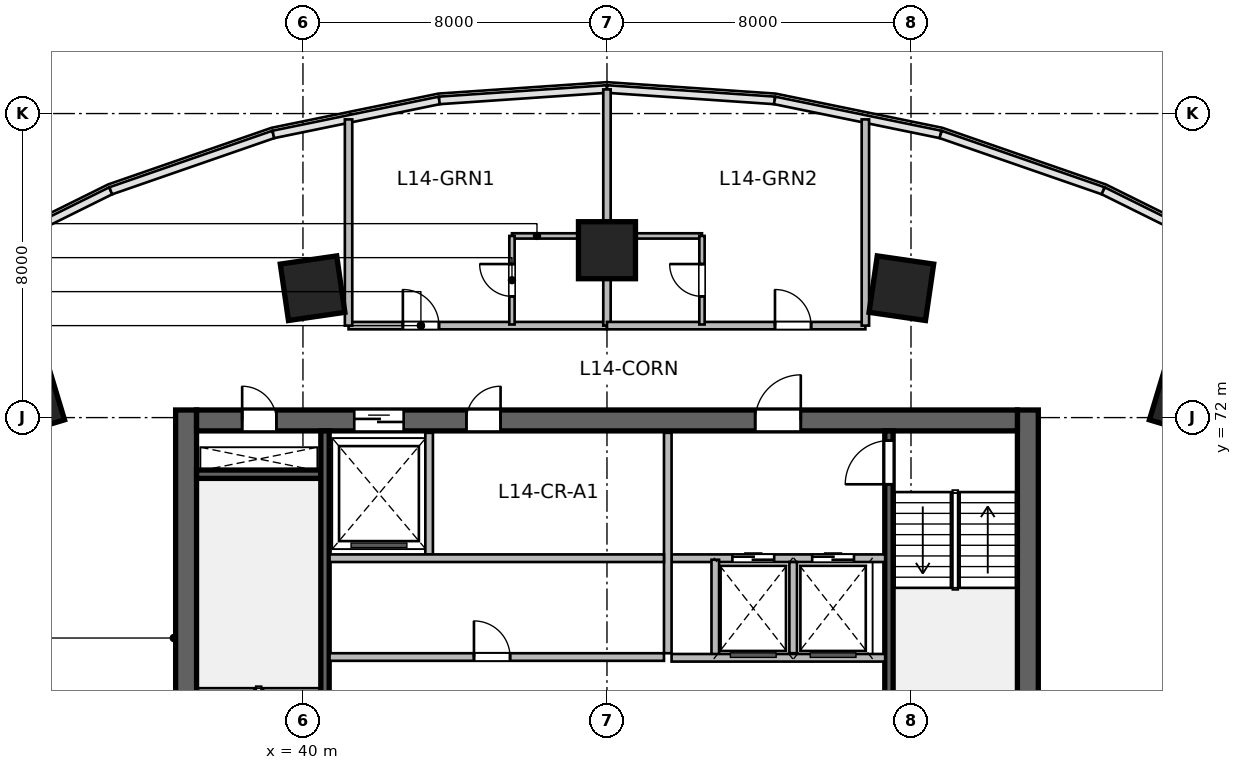
"""IFC4 building model, lengths in metres.
Left out: names, types, materials, properties, quantities, classifications, styles, units other than length and angle.
Written with IfcOpenShell. Run it as: python <this file> out.ifc"""

import sys

from ifc_helpers import new_model, si_unit, direction, frame, frame_2d, origin, origin_2d, place, context, subcontext, project, spatial, rectangle, extrude, source, transform, mapped, element, fill, save


model = new_model("IFC4")
c1 = context("Model", 3, precision=1e-05, world=origin(), true_north=direction((0.0, 1.0)))
c2 = subcontext(c1, "Body", "Model", "MODEL_VIEW")
j1 = project(units=[si_unit("LENGTHUNIT", "METRE"), si_unit("PLANEANGLEUNIT", "RADIAN")], contexts=[c1])
p1 = place(None, origin())
s1 = spatial("IfcSite", under=j1, at=p1, CompositionType="ELEMENT")
p2 = place(p1, origin())
s2 = spatial("IfcBuilding", under=s1, at=p2, CompositionType="ELEMENT")
p3 = place(p2, frame((0.0, 0.0, 64.2)))
s3 = spatial("IfcBuildingStorey", under=s2, at=p3, CompositionType="ELEMENT", Elevation=64.2)
m1 = source(origin(), c2, "Body", "SweptSolid", [
    extrude(rectangle(XDim=12.0, YDim=0.55, at=frame_2d((6.0, 0.0))), origin(), (0.0, 0.0, 1.0), 3.6),
])
for number, where, z_axis, x_axis in (
    (1, (36.925, 60.2, 0.0), (0.0, 0.0, 1.0), (0.0, 1.0, 0.0)),
    (2, (59.075, 60.2, 0.0), (0.0, 0.0, 1.0), (0.0, 1.0, 0.0)),
):
    element("IfcWall", number, at=place(p3, frame(where, z_axis=z_axis, x_axis=x_axis)), inside=s3, PredefinedType="SHEAR", context=c2, shape_type="MappedRepresentation", body=[
        mapped(m1, transform((0.0, 0.0, 0.0), scale=1.0)),
    ])
m2 = source(origin(), c2, "Body", "SweptSolid", [
    extrude(rectangle(XDim=21.6, YDim=0.55, at=frame_2d((10.8, 0.0))), origin(), (0.0, 0.0, 1.0), 3.6),
])
p4 = place(p3, frame((37.2, 71.925, 0.0), z_axis=(0.0, 0.0, 1.0), x_axis=(1.0, 0.0, 0.0)))
e3 = element("IfcWall", 3, at=p4, inside=s3, PredefinedType="SHEAR", context=c2, shape_type="MappedRepresentation", body=[
    mapped(m2, transform((0.0, 0.0, 0.0), scale=1.0)),
])
p5 = place(p4, frame((1.2, 0.0, 0.0)))
e4 = element("IfcOpeningElement", 4, at=p5, cuts=e3, PredefinedType="OPENING", context=c2, shape_type="SweptSolid", body=[
    extrude(rectangle(XDim=0.9, YDim=2.1, at=frame_2d((0.45, 1.05))), frame((0.0, 0.285, 0.0), z_axis=(0.0, -1.0, 0.0), x_axis=(1.0, 0.0, 0.0)), (0.0, 0.0, 1.0), 0.57),
])
p6 = place(p4, frame((14.7, 0.0, 0.0)))
e5 = element("IfcOpeningElement", 5, at=p6, cuts=e3, PredefinedType="OPENING", context=c2, shape_type="SweptSolid", body=[
    extrude(rectangle(XDim=1.2, YDim=2.15, at=frame_2d((0.6, 1.075))), frame((0.0, 0.285, 0.0), z_axis=(0.0, -1.0, 0.0), x_axis=(1.0, 0.0, 0.0)), (0.0, 0.0, 1.0), 0.57),
])
p7 = place(p4, frame((4.15, 0.0, 0.0)))
e6 = element("IfcOpeningElement", 6, at=p7, cuts=e3, PredefinedType="OPENING", context=c2, shape_type="SweptSolid", body=[
    extrude(rectangle(XDim=1.3, YDim=2.15, at=frame_2d((0.65, 1.075))), frame((0.0, 0.285, 0.0), z_axis=(0.0, -1.0, 0.0), x_axis=(1.0, 0.0, 0.0)), (0.0, 0.0, 1.0), 0.57),
])
p8 = place(p4, frame((7.1, 0.0, 0.0)))
e7 = element("IfcOpeningElement", 7, at=p8, cuts=e3, PredefinedType="OPENING", context=c2, shape_type="SweptSolid", body=[
    extrude(rectangle(XDim=0.9, YDim=2.1, at=frame_2d((0.45, 1.05))), frame((0.0, 0.285, 0.0), z_axis=(0.0, -1.0, 0.0), x_axis=(1.0, 0.0, 0.0)), (0.0, 0.0, 1.0), 0.57),
])
m3 = source(origin(), c2, "Body", "SweptSolid", [
    extrude(rectangle(XDim=3.27, YDim=0.22, at=frame_2d((1.635, 0.0))), origin(), (0.0, 0.0, 1.0), 3.6),
])
p9 = place(p3, frame((37.2, 70.51, 0.0), z_axis=(0.0, 0.0, 1.0), x_axis=(1.0, 0.0, 0.0)))
e8 = element("IfcWall", 8, at=p9, inside=s3, PredefinedType="SHEAR", context=c2, shape_type="MappedRepresentation", body=[
    mapped(m3, transform((0.0, 0.0, 0.0), scale=1.0)),
])
m4 = source(origin(), c2, "Body", "SweptSolid", [
    extrude(rectangle(XDim=10.9, YDim=0.22, at=frame_2d((5.45, 0.0))), origin(), (0.0, 0.0, 1.0), 3.6),
])
p10 = place(p3, frame((40.58, 60.75, 0.0), z_axis=(0.0, 0.0, 1.0), x_axis=(0.0, 1.0, 0.0)))
e9 = element("IfcWall", 9, at=p10, inside=s3, PredefinedType="SHEAR", context=c2, shape_type="MappedRepresentation", body=[
    mapped(m4, transform((0.0, 0.0, 0.0), scale=1.0)),
])
p11 = place(p3, frame((55.42, 60.75, 0.0), z_axis=(0.0, 0.0, 1.0), x_axis=(0.0, 1.0, 0.0)))
e10 = element("IfcWall", 10, at=p11, inside=s3, PredefinedType="SHEAR", context=c2, shape_type="MappedRepresentation", body=[
    mapped(m4, transform((0.0, 0.0, 0.0), scale=1.0)),
])
p12 = place(p11, frame((9.495, 0.0, 0.0)))
e11 = element("IfcOpeningElement", 11, at=p12, cuts=e10, PredefinedType="OPENING", context=c2, shape_type="SweptSolid", body=[
    extrude(rectangle(XDim=1.15, YDim=2.15, at=frame_2d((0.575, 1.075))), frame((0.0, 0.12, 0.0), z_axis=(0.0, -1.0, 0.0), x_axis=(1.0, 0.0, 0.0)), (0.0, 0.0, 1.0), 0.24),
])
m5 = source(origin(), c2, "Body", "SweptSolid", [
    extrude(rectangle(XDim=1.5, YDim=1.5, at=origin_2d()), origin(), (0.0, 0.0, 1.0), 3.6),
])
for number, where, z_axis, x_axis in (
    (12, (32.791, 72.442, 0.0), (0.0, 0.0, 1.0), (-0.289, 0.957, 0.0)),
    (13, (40.253, 75.404, 0.0), (0.0, 0.0, 1.0), (-0.143, 0.99, 0.0)),
    (14, (48.0, 76.404, 0.0), (0.0, 0.0, 1.0), (0.0, 1.0, 0.0)),
    (15, (55.747, 75.404, 0.0), (0.0, 0.0, 1.0), (0.143, 0.99, 0.0)),
    (16, (63.209, 72.442, 0.0), (0.0, 0.0, 1.0), (0.289, 0.957, 0.0)),
):
    element("IfcColumn", number, at=place(p3, frame(where, z_axis=z_axis, x_axis=x_axis)), inside=s3, PredefinedType="COLUMN", context=c2, shape_type="MappedRepresentation", body=[
        mapped(m5, transform((0.0, 0.0, 0.0), scale=1.0)),
    ])
m6 = source(origin(), c2, "Body", "SweptSolid", [
    extrude(rectangle(XDim=5.62, YDim=0.2, at=frame_2d((2.81, 0.0))), origin(), (0.0, 0.0, 1.0), 3.36),
])
p13 = place(p3, frame((49.7, 68.3, 0.0), z_axis=(0.0, 0.0, 1.0), x_axis=(1.0, 0.0, 0.0)))
e17 = element("IfcWall", 17, at=p13, inside=s3, PredefinedType="SOLIDWALL", context=c2, shape_type="MappedRepresentation", body=[
    mapped(m6, transform((0.0, 0.0, 0.0), scale=1.0)),
])
p14 = place(p13, frame((1.6, 0.0, 0.0)))
e18 = element("IfcOpeningElement", 18, at=p14, cuts=e17, PredefinedType="OPENING", context=c2, shape_type="SweptSolid", body=[
    extrude(rectangle(XDim=1.1, YDim=2.15, at=frame_2d((0.55, 1.075))), frame((0.0, 0.11, 0.0), z_axis=(0.0, -1.0, 0.0), x_axis=(1.0, 0.0, 0.0)), (0.0, 0.0, 1.0), 0.22),
])
p15 = place(p13, frame((3.7, 0.0, 0.0)))
e19 = element("IfcOpeningElement", 19, at=p15, cuts=e17, PredefinedType="OPENING", context=c2, shape_type="SweptSolid", body=[
    extrude(rectangle(XDim=1.1, YDim=2.15, at=frame_2d((0.55, 1.075))), frame((0.0, 0.11, 0.0), z_axis=(0.0, -1.0, 0.0), x_axis=(1.0, 0.0, 0.0)), (0.0, 0.0, 1.0), 0.22),
])
m7 = source(origin(), c2, "Body", "SweptSolid", [
    extrude(rectangle(XDim=5.8, YDim=0.2, at=frame_2d((2.9, 0.0))), origin(), (0.0, 0.0, 1.0), 3.36),
])
p16 = place(p3, frame((49.6, 65.8, 0.0), z_axis=(0.0, 0.0, 1.0), x_axis=(0.0, 1.0, 0.0)))
e20 = element("IfcWall", 20, at=p16, inside=s3, PredefinedType="SOLIDWALL", context=c2, shape_type="MappedRepresentation", body=[
    mapped(m7, transform((0.0, 0.0, 0.0), scale=1.0)),
])
m8 = source(origin(), c2, "Body", "SweptSolid", [
    extrude(rectangle(XDim=2.58, YDim=0.2, at=frame_2d((1.29, 0.0))), origin(), (0.0, 0.0, 1.0), 3.36),
])
p17 = place(p3, frame((50.85, 65.68, 0.0), z_axis=(0.0, 0.0, 1.0), x_axis=(0.0, 1.0, 0.0)))
e21 = element("IfcWall", 21, at=p17, inside=s3, PredefinedType="SOLIDWALL", context=c2, shape_type="MappedRepresentation", body=[
    mapped(m8, transform((0.0, 0.0, 0.0), scale=1.0)),
])
m9 = source(origin(), c2, "Body", "SweptSolid", [
    extrude(rectangle(XDim=2.4, YDim=0.2, at=frame_2d((1.2, 0.0))), origin(), (0.0, 0.0, 1.0), 3.36),
])
p18 = place(p3, frame((52.9, 65.8, 0.0), z_axis=(0.0, 0.0, 1.0), x_axis=(0.0, 1.0, 0.0)))
e22 = element("IfcWall", 22, at=p18, inside=s3, PredefinedType="SOLIDWALL", context=c2, shape_type="MappedRepresentation", body=[
    mapped(m9, transform((0.0, 0.0, 0.0), scale=1.0)),
])
p19 = place(p3, frame((49.7, 65.68, 0.0), z_axis=(0.0, 0.0, 1.0), x_axis=(1.0, 0.0, 0.0)))
e23 = element("IfcWall", 23, at=p19, inside=s3, PredefinedType="SOLIDWALL", context=c2, shape_type="MappedRepresentation", body=[
    mapped(m6, transform((0.0, 0.0, 0.0), scale=1.0)),
])
m10 = source(origin(), c2, "Body", "SweptSolid", [
    extrude(rectangle(XDim=3.2, YDim=0.2, at=frame_2d((1.6, 0.0))), origin(), (0.0, 0.0, 1.0), 3.36),
])
p20 = place(p3, frame((43.32, 68.4, 0.0), z_axis=(0.0, 0.0, 1.0), x_axis=(0.0, 1.0, 0.0)))
e24 = element("IfcWall", 24, at=p20, inside=s3, PredefinedType="SOLIDWALL", context=c2, shape_type="MappedRepresentation", body=[
    mapped(m10, transform((0.0, 0.0, 0.0), scale=1.0)),
])
m11 = source(origin(), c2, "Body", "SweptSolid", [
    extrude(rectangle(XDim=8.8, YDim=0.2, at=frame_2d((4.4, 0.0))), origin(), (0.0, 0.0, 1.0), 3.36),
])
p21 = place(p3, frame((40.7, 68.3, 0.0), z_axis=(0.0, 0.0, 1.0), x_axis=(1.0, 0.0, 0.0)))
e25 = element("IfcWall", 25, at=p21, inside=s3, PredefinedType="SOLIDWALL", context=c2, shape_type="MappedRepresentation", body=[
    mapped(m11, transform((0.0, 0.0, 0.0), scale=1.0)),
])
p22 = place(p3, frame((40.7, 65.7, 0.0), z_axis=(0.0, 0.0, 1.0), x_axis=(1.0, 0.0, 0.0)))
e26 = element("IfcWall", 26, at=p22, inside=s3, PredefinedType="SOLIDWALL", context=c2, shape_type="MappedRepresentation", body=[
    mapped(m11, transform((0.0, 0.0, 0.0), scale=1.0)),
])
p23 = place(p22, frame((3.8, 0.0, 0.0)))
e27 = element("IfcOpeningElement", 27, at=p23, cuts=e26, PredefinedType="OPENING", context=c2, shape_type="SweptSolid", body=[
    extrude(rectangle(XDim=0.95, YDim=2.15, at=frame_2d((0.475, 1.075))), frame((0.0, 0.11, 0.0), z_axis=(0.0, -1.0, 0.0), x_axis=(1.0, 0.0, 0.0)), (0.0, 0.0, 1.0), 0.22),
])
m12 = source(origin(), c2, "Body", "SweptSolid", [
    extrude(rectangle(XDim=6.8, YDim=0.195, at=frame_2d((3.4, 0.0))), origin(), (0.0, 0.0, 1.0), 3.36),
])
p24 = place(p3, frame((41.2, 74.42, 0.0), z_axis=(0.0, 0.0, 1.0), x_axis=(1.0, 0.0, 0.0)))
e28 = element("IfcWall", 28, at=p24, inside=s3, PredefinedType="PARTITIONING", context=c2, shape_type="MappedRepresentation", body=[
    mapped(m12, transform((0.0, 0.0, 0.0), scale=1.0)),
])
p25 = place(p24, frame((1.429, 0.0, 0.0)))
e29 = element("IfcOpeningElement", 29, at=p25, cuts=e28, PredefinedType="OPENING", context=c2, shape_type="SweptSolid", body=[
    extrude(rectangle(XDim=0.95, YDim=2.15, at=frame_2d((0.475, 1.075))), frame((0.0, 0.107, 0.0), z_axis=(0.0, -1.0, 0.0), x_axis=(1.0, 0.0, 0.0)), (0.0, 0.0, 1.0), 0.215),
])
m13 = source(origin(), c2, "Body", "SweptSolid", [
    extrude(rectangle(XDim=6.216, YDim=0.195, at=frame_2d((3.108, 0.0))), origin(), (0.0, 0.0, 1.0), 2.644),
])
p26 = place(p3, frame((48.0, 74.42, 0.0), z_axis=(0.0, 0.0, 1.0), x_axis=(0.0, 1.0, 0.0)))
e30 = element("IfcWall", 30, at=p26, inside=s3, PredefinedType="PARTITIONING", context=c2, shape_type="MappedRepresentation", body=[
    mapped(m13, transform((0.0, 0.0, 0.0), scale=1.0)),
])
m14 = source(origin(), c2, "Body", "SweptSolid", [
    extrude(rectangle(XDim=5.426, YDim=0.195, at=frame_2d((2.713, 0.0))), origin(), (0.0, 0.0, 1.0), 3.36),
])
p27 = place(p3, frame((41.2, 74.42, 0.0), z_axis=(0.0, 0.0, 1.0), x_axis=(0.0, 1.0, 0.0)))
e31 = element("IfcWall", 31, at=p27, inside=s3, PredefinedType="PARTITIONING", context=c2, shape_type="MappedRepresentation", body=[
    mapped(m14, transform((0.0, 0.0, 0.0), scale=1.0)),
])
m15 = source(origin(), c2, "Body", "SweptSolid", [
    extrude(rectangle(XDim=2.35, YDim=0.14, at=frame_2d((1.175, 0.0))), origin(), (0.0, 0.0, 1.0), 3.36),
])
p28 = place(p3, frame((45.5, 76.78, 0.0), z_axis=(0.0, 0.0, 1.0), x_axis=(1.0, 0.0, 0.0)))
e32 = element("IfcWall", 32, at=p28, inside=s3, PredefinedType="PARTITIONING", context=c2, shape_type="MappedRepresentation", body=[
    mapped(m15, transform((0.0, 0.0, 0.0), scale=1.0)),
])
m16 = source(origin(), c2, "Body", "SweptSolid", [
    extrude(rectangle(XDim=2.33, YDim=0.14, at=frame_2d((1.165, 0.0))), origin(), (0.0, 0.0, 1.0), 3.36),
])
p29 = place(p3, frame((45.5, 74.45, 0.0), z_axis=(0.0, 0.0, 1.0), x_axis=(0.0, 1.0, 0.0)))
e33 = element("IfcWall", 33, at=p29, inside=s3, PredefinedType="PARTITIONING", context=c2, shape_type="MappedRepresentation", body=[
    mapped(m16, transform((0.0, 0.0, 0.0), scale=1.0)),
])
p30 = place(p29, frame((0.74, 0.0, 0.0)))
e34 = element("IfcOpeningElement", 34, at=p30, cuts=e33, PredefinedType="OPENING", context=c2, shape_type="SweptSolid", body=[
    extrude(rectangle(XDim=0.85, YDim=2.05, at=frame_2d((0.425, 1.025))), frame((0.0, 0.08, 0.0), z_axis=(0.0, -1.0, 0.0), x_axis=(1.0, 0.0, 0.0)), (0.0, 0.0, 1.0), 0.16),
])
p31 = place(p3, frame((48.0, 74.42, 0.0), z_axis=(0.0, 0.0, 1.0), x_axis=(1.0, 0.0, 0.0)))
e35 = element("IfcWall", 35, at=p31, inside=s3, PredefinedType="PARTITIONING", context=c2, shape_type="MappedRepresentation", body=[
    mapped(m12, transform((0.0, 0.0, 0.0), scale=1.0)),
])
p32 = place(p31, frame((4.421, 0.0, 0.0)))
e36 = element("IfcOpeningElement", 36, at=p32, cuts=e35, PredefinedType="OPENING", context=c2, shape_type="SweptSolid", body=[
    extrude(rectangle(XDim=0.95, YDim=2.15, at=frame_2d((0.475, 1.075))), frame((0.0, 0.107, 0.0), z_axis=(0.0, -1.0, 0.0), x_axis=(1.0, 0.0, 0.0)), (0.0, 0.0, 1.0), 0.215),
])
p33 = place(p3, frame((54.8, 74.42, 0.0), z_axis=(0.0, 0.0, 1.0), x_axis=(0.0, 1.0, 0.0)))
e37 = element("IfcWall", 37, at=p33, inside=s3, PredefinedType="PARTITIONING", context=c2, shape_type="MappedRepresentation", body=[
    mapped(m14, transform((0.0, 0.0, 0.0), scale=1.0)),
])
p34 = place(p3, frame((48.15, 76.78, 0.0), z_axis=(0.0, 0.0, 1.0), x_axis=(1.0, 0.0, 0.0)))
e38 = element("IfcWall", 38, at=p34, inside=s3, PredefinedType="PARTITIONING", context=c2, shape_type="MappedRepresentation", body=[
    mapped(m15, transform((0.0, 0.0, 0.0), scale=1.0)),
])
p35 = place(p3, frame((50.5, 74.45, 0.0), z_axis=(0.0, 0.0, 1.0), x_axis=(0.0, 1.0, 0.0)))
e39 = element("IfcWall", 39, at=p35, inside=s3, PredefinedType="PARTITIONING", context=c2, shape_type="MappedRepresentation", body=[
    mapped(m16, transform((0.0, 0.0, 0.0), scale=1.0)),
])
p36 = place(p35, frame((0.74, 0.0, 0.0)))
e40 = element("IfcOpeningElement", 40, at=p36, cuts=e39, PredefinedType="OPENING", context=c2, shape_type="SweptSolid", body=[
    extrude(rectangle(XDim=0.85, YDim=2.05, at=frame_2d((0.425, 1.025))), frame((0.0, 0.08, 0.0), z_axis=(0.0, -1.0, 0.0), x_axis=(1.0, 0.0, 0.0)), (0.0, 0.0, 1.0), 0.16),
])
m17 = source(origin(), c2, "Body", "SweptSolid", [
    extrude(rectangle(XDim=0.9, YDim=2.1, at=frame_2d((0.45, 1.05))), frame((0.0, 0.025, 0.0), z_axis=(0.0, -1.0, 0.0), x_axis=(1.0, 0.0, 0.0)), (0.0, 0.0, 1.0), 0.05),
])
p37 = place(p5, origin())
e41 = element("IfcDoor", 41, at=p37, inside=s3, OperationType="SINGLE_SWING_LEFT", PredefinedType="DOOR", context=c2, shape_type="MappedRepresentation", body=[
    mapped(m17, transform((0.0, 0.0, 0.0), scale=1.0)),
])
fill(e4, e41)
m18 = source(origin(), c2, "Body", "SweptSolid", [
    extrude(rectangle(XDim=1.15, YDim=2.15, at=frame_2d((0.575, 1.075))), frame((0.0, 0.025, 0.0), z_axis=(0.0, -1.0, 0.0), x_axis=(1.0, 0.0, 0.0)), (0.0, 0.0, 1.0), 0.05),
])
p38 = place(p12, origin())
e42 = element("IfcDoor", 42, at=p38, inside=s3, OperationType="SINGLE_SWING_LEFT", PredefinedType="DOOR", context=c2, shape_type="MappedRepresentation", body=[
    mapped(m18, transform((0.0, 0.0, 0.0), scale=1.0)),
])
fill(e11, e42)
m19 = source(origin(), c2, "Body", "SweptSolid", [
    extrude(rectangle(XDim=1.2, YDim=2.15, at=frame_2d((0.6, 1.075))), frame((0.0, 0.025, 0.0), z_axis=(0.0, -1.0, 0.0), x_axis=(1.0, 0.0, 0.0)), (0.0, 0.0, 1.0), 0.05),
])
p39 = place(p6, origin())
e43 = element("IfcDoor", 43, at=p39, inside=s3, OperationType="SINGLE_SWING_RIGHT", PredefinedType="DOOR", context=c2, shape_type="MappedRepresentation", body=[
    mapped(m19, transform((0.0, 0.0, 0.0), scale=1.0)),
])
fill(e5, e43)
m20 = source(origin(), c2, "Body", "SweptSolid", [
    extrude(rectangle(XDim=1.1, YDim=2.15, at=frame_2d((0.55, 1.075))), frame((0.0, 0.025, 0.0), z_axis=(0.0, -1.0, 0.0), x_axis=(1.0, 0.0, 0.0)), (0.0, 0.0, 1.0), 0.05),
])
p40 = place(p14, origin())
e44 = element("IfcDoor", 44, at=p40, inside=s3, OperationType="DOUBLE_DOOR_SLIDING", PredefinedType="DOOR", context=c2, shape_type="MappedRepresentation", body=[
    mapped(m20, transform((0.0, 0.0, 0.0), scale=1.0)),
])
fill(e18, e44)
p41 = place(p15, origin())
e45 = element("IfcDoor", 45, at=p41, inside=s3, OperationType="DOUBLE_DOOR_SLIDING", PredefinedType="DOOR", context=c2, shape_type="MappedRepresentation", body=[
    mapped(m20, transform((0.0, 0.0, 0.0), scale=1.0)),
])
fill(e19, e45)
m21 = source(origin(), c2, "Body", "SweptSolid", [
    extrude(rectangle(XDim=1.3, YDim=2.15, at=frame_2d((0.65, 1.075))), frame((0.0, 0.025, 0.0), z_axis=(0.0, -1.0, 0.0), x_axis=(1.0, 0.0, 0.0)), (0.0, 0.0, 1.0), 0.05),
])
p42 = place(p7, origin())
e46 = element("IfcDoor", 46, at=p42, inside=s3, OperationType="DOUBLE_DOOR_SLIDING", PredefinedType="DOOR", context=c2, shape_type="MappedRepresentation", body=[
    mapped(m21, transform((0.0, 0.0, 0.0), scale=1.0)),
])
fill(e6, e46)
p43 = place(p8, origin())
e47 = element("IfcDoor", 47, at=p43, inside=s3, OperationType="SINGLE_SWING_RIGHT", PredefinedType="DOOR", context=c2, shape_type="MappedRepresentation", body=[
    mapped(m17, transform((0.0, 0.0, 0.0), scale=1.0)),
])
fill(e7, e47)
m22 = source(origin(), c2, "Body", "SweptSolid", [
    extrude(rectangle(XDim=0.95, YDim=2.15, at=frame_2d((0.475, 1.075))), frame((0.0, 0.025, 0.0), z_axis=(0.0, -1.0, 0.0), x_axis=(1.0, 0.0, 0.0)), (0.0, 0.0, 1.0), 0.05),
])
p44 = place(p23, origin())
e48 = element("IfcDoor", 48, at=p44, inside=s3, OperationType="SINGLE_SWING_LEFT", PredefinedType="DOOR", context=c2, shape_type="MappedRepresentation", body=[
    mapped(m22, transform((0.0, 0.0, 0.0), scale=1.0)),
])
fill(e27, e48)
p45 = place(p25, origin())
e49 = element("IfcDoor", 49, at=p45, inside=s3, OperationType="SINGLE_SWING_LEFT", PredefinedType="DOOR", context=c2, shape_type="MappedRepresentation", body=[
    mapped(m22, transform((0.0, 0.0, 0.0), scale=1.0)),
])
fill(e29, e49)
m23 = source(origin(), c2, "Body", "SweptSolid", [
    extrude(rectangle(XDim=0.85, YDim=2.05, at=frame_2d((0.425, 1.025))), frame((0.0, 0.025, 0.0), z_axis=(0.0, -1.0, 0.0), x_axis=(1.0, 0.0, 0.0)), (0.0, 0.0, 1.0), 0.05),
])
p46 = place(p30, origin())
e50 = element("IfcDoor", 50, at=p46, inside=s3, OperationType="SINGLE_SWING_RIGHT", PredefinedType="DOOR", context=c2, shape_type="MappedRepresentation", body=[
    mapped(m23, transform((0.0, 0.0, 0.0), scale=1.0)),
])
fill(e34, e50)
p47 = place(p32, origin())
e51 = element("IfcDoor", 51, at=p47, inside=s3, OperationType="SINGLE_SWING_LEFT", PredefinedType="DOOR", context=c2, shape_type="MappedRepresentation", body=[
    mapped(m22, transform((0.0, 0.0, 0.0), scale=1.0)),
])
fill(e36, e51)
p48 = place(p36, origin())
e52 = element("IfcDoor", 52, at=p48, inside=s3, OperationType="SINGLE_SWING_RIGHT", PredefinedType="DOOR", context=c2, shape_type="MappedRepresentation", body=[
    mapped(m23, transform((0.0, 0.0, 0.0), scale=1.0)),
])
fill(e40, e52)
save(model, sys.argv[1])
